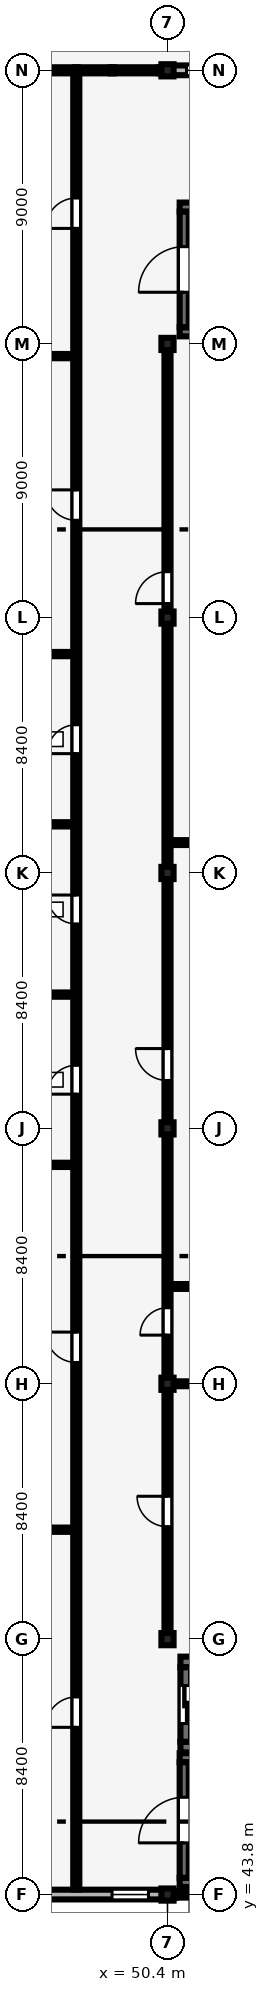
"""IFC4 building model, lengths in metres.
Left out: names, types, materials, properties, quantities, classifications, styles, units other than length and angle.
Written with IfcOpenShell. Run it as: python <this file> out.ifc"""

import sys

from ifc_helpers import new_model, si_unit, direction, frame, frame_2d, origin, origin_2d, place, context, subcontext, project, spatial, rectangle, extrude, element, fill, save


model = new_model("IFC4")
c1 = context("Model", 3, precision=1e-05, world=origin(), true_north=direction((0.0, 1.0)))
c2 = subcontext(c1, "Body", "Model", "MODEL_VIEW")
j1 = project(units=[si_unit("LENGTHUNIT", "METRE"), si_unit("PLANEANGLEUNIT", "RADIAN")], contexts=[c1])
p1 = place(None, origin())
s1 = spatial("IfcSite", under=j1, at=p1, CompositionType="ELEMENT")
p2 = place(p1, origin())
s2 = spatial("IfcBuilding", under=s1, at=p2, CompositionType="ELEMENT")
p3 = place(p2, frame((0.0, 0.0, 21.6)))
s3 = spatial("IfcBuildingStorey", under=s2, at=p3, CompositionType="ELEMENT", Elevation=21.6)
for number, where, z_axis, x_axis in (
    (1, (50.4, 43.8, 0.0), (0.0, 0.0, 1.0), (1.0, 0.0, 0.0)),
    (2, (50.4, 52.2, 0.0), (0.0, 0.0, 1.0), (1.0, 0.0, 0.0)),
    (3, (50.4, 60.6, 0.0), (0.0, 0.0, 1.0), (1.0, 0.0, 0.0)),
    (4, (50.4, 69.0, 0.0), (0.0, 0.0, 1.0), (1.0, 0.0, 0.0)),
    (5, (50.4, 77.4, 0.0), (0.0, 0.0, 1.0), (1.0, 0.0, 0.0)),
    (6, (50.4, 85.8, 0.0), (0.0, 0.0, 1.0), (1.0, 0.0, 0.0)),
    (7, (50.4, 94.8, 0.0), (0.0, 0.0, 1.0), (1.0, 0.0, 0.0)),
    (8, (50.4, 103.8, 0.0), (0.0, 0.0, 1.0), (1.0, 0.0, 0.0)),
):
    element("IfcColumn", number, at=place(p3, frame(where, z_axis=z_axis, x_axis=x_axis)), inside=s3, PredefinedType="COLUMN", context=c2, shape_type="SweptSolid", body=[
        extrude(rectangle(XDim=0.4, YDim=0.4, at=origin_2d()), origin(), (0.0, 0.0, 1.0), 4.2),
    ])
p4 = place(p3, frame((42.175, 43.8, 0.0), z_axis=(0.0, 0.0, 1.0), x_axis=(1.0, 0.0, 0.0)))
e9 = element("IfcWall", 9, at=p4, inside=s3, PredefinedType="SOLIDWALL", context=c2, shape_type="SweptSolid", body=[
    extrude(rectangle(XDim=8.05, YDim=0.32, at=frame_2d((4.025, 0.0))), origin(), (0.0, 0.0, 1.0), 3.48),
])
p5 = place(p4, frame((0.45, 0.0, 0.9)))
e10 = element("IfcOpeningElement", 10, at=p5, cuts=e9, PredefinedType="OPENING", context=c2, shape_type="SweptSolid", body=[
    extrude(rectangle(XDim=1.2, YDim=1.5, at=frame_2d((0.6, 0.75))), frame((0.0, 0.17, 0.0), z_axis=(0.0, -1.0, 0.0), x_axis=(1.0, 0.0, 0.0)), (0.0, 0.0, 1.0), 0.34),
])
p6 = place(p4, frame((6.4, 0.0, 0.9)))
e11 = element("IfcOpeningElement", 11, at=p6, cuts=e9, PredefinedType="OPENING", context=c2, shape_type="SweptSolid", body=[
    extrude(rectangle(XDim=1.2, YDim=1.8, at=frame_2d((0.6, 0.9))), frame((0.0, 0.17, 0.0), z_axis=(0.0, -1.0, 0.0), x_axis=(1.0, 0.0, 0.0)), (0.0, 0.0, 1.0), 0.34),
])
p7 = place(p3, frame((50.575, 103.8, 0.0), z_axis=(0.0, 0.0, 1.0), x_axis=(1.0, 0.0, 0.0)))
e12 = element("IfcWall", 12, at=p7, inside=s3, PredefinedType="SOLIDWALL", context=c2, shape_type="SweptSolid", body=[
    extrude(rectangle(XDim=8.05, YDim=0.32, at=frame_2d((4.025, 0.0))), origin(), (0.0, 0.0, 1.0), 3.48),
])
p8 = place(p7, frame((0.45, 0.0, 0.9)))
e13 = element("IfcOpeningElement", 13, at=p8, cuts=e12, PredefinedType="OPENING", context=c2, shape_type="SweptSolid", body=[
    extrude(rectangle(XDim=1.2, YDim=1.8, at=frame_2d((0.6, 0.9))), frame((0.0, 0.17, 0.0), z_axis=(0.0, -1.0, 0.0), x_axis=(1.0, 0.0, 0.0)), (0.0, 0.0, 1.0), 0.34),
])
p9 = place(p7, frame((5.77, 0.0, 0.9)))
e14 = element("IfcOpeningElement", 14, at=p9, cuts=e12, PredefinedType="OPENING", context=c2, shape_type="SweptSolid", body=[
    extrude(rectangle(XDim=1.68, YDim=2.4, at=frame_2d((0.84, 1.2))), frame((0.0, 0.17, 0.0), z_axis=(0.0, -1.0, 0.0), x_axis=(1.0, 0.0, 0.0)), (0.0, 0.0, 1.0), 0.34),
])
for number, where, z_axis, x_axis in (
    (15, (50.8, 44.2, 0.0), (0.0, 0.0, 1.0), (1.0, 0.0, 0.0)),
    (16, (50.8, 48.3, 0.0), (0.0, 0.0, 1.0), (1.0, 0.0, 0.0)),
):
    element("IfcWall", number, at=place(p3, frame(where, z_axis=z_axis, x_axis=x_axis)), inside=s3, PredefinedType="SHEAR", context=c2, shape_type="SweptSolid", body=[
        extrude(rectangle(XDim=7.6, YDim=0.3, at=frame_2d((3.8, 0.0))), origin(), (0.0, 0.0, 1.0), 4.025),
    ])
p10 = place(p3, frame((50.95, 44.35, 0.0), z_axis=(0.0, 0.0, 1.0), x_axis=(0.0, 1.0, 0.0)))
e17 = element("IfcWall", 17, at=p10, inside=s3, PredefinedType="SHEAR", context=c2, shape_type="SweptSolid", body=[
    extrude(rectangle(XDim=3.8, YDim=0.3, at=frame_2d((1.9, 0.0))), origin(), (0.0, 0.0, 1.0), 4.025),
])
p11 = place(p10, frame((1.15, 0.0, 0.0)))
e18 = element("IfcOpeningElement", 18, at=p11, cuts=e17, PredefinedType="OPENING", context=c2, shape_type="SweptSolid", body=[
    extrude(rectangle(XDim=1.5, YDim=2.2, at=frame_2d((0.75, 1.1))), frame((0.0, 0.16, 0.0), z_axis=(0.0, -1.0, 0.0), x_axis=(1.0, 0.0, 0.0)), (0.0, 0.0, 1.0), 0.32),
])
for number, where, z_axis, x_axis in (
    (19, (50.825, 48.65, 0.0), (0.0, 0.0, 1.0), (1.0, 0.0, 0.0)),
    (20, (50.825, 51.45, 0.0), (0.0, 0.0, 1.0), (1.0, 0.0, 0.0)),
):
    element("IfcWall", number, at=place(p3, frame(where, z_axis=z_axis, x_axis=x_axis)), inside=s3, PredefinedType="SHEAR", context=c2, shape_type="SweptSolid", body=[
        extrude(rectangle(XDim=3.55, YDim=0.35, at=frame_2d((1.775, 0.0))), origin(), (0.0, 0.0, 1.0), 3.92),
    ])
p12 = place(p3, frame((51.0, 48.825, 0.0), z_axis=(0.0, 0.0, 1.0), x_axis=(0.0, 1.0, 0.0)))
e21 = element("IfcWall", 21, at=p12, inside=s3, PredefinedType="SHEAR", context=c2, shape_type="SweptSolid", body=[
    extrude(rectangle(XDim=2.45, YDim=0.35, at=frame_2d((1.225, 0.0))), origin(), (0.0, 0.0, 1.0), 3.92),
])
p13 = place(p12, frame((0.6, 0.0, 0.0)))
e22 = element("IfcOpeningElement", 22, at=p13, cuts=e21, PredefinedType="OPENING", context=c2, shape_type="SweptSolid", body=[
    extrude(rectangle(XDim=1.25, YDim=2.25, at=frame_2d((0.625, 1.125))), frame((0.0, 0.185, 0.0), z_axis=(0.0, -1.0, 0.0), x_axis=(1.0, 0.0, 0.0)), (0.0, 0.0, 1.0), 0.37),
])
for number, where, z_axis, x_axis in (
    (23, (50.8, 95.2, 0.0), (0.0, 0.0, 1.0), (1.0, 0.0, 0.0)),
    (24, (50.8, 99.3, 0.0), (0.0, 0.0, 1.0), (1.0, 0.0, 0.0)),
):
    element("IfcWall", number, at=place(p3, frame(where, z_axis=z_axis, x_axis=x_axis)), inside=s3, PredefinedType="SHEAR", context=c2, shape_type="SweptSolid", body=[
        extrude(rectangle(XDim=7.6, YDim=0.3, at=frame_2d((3.8, 0.0))), origin(), (0.0, 0.0, 1.0), 4.025),
    ])
p14 = place(p3, frame((50.95, 95.35, 0.0), z_axis=(0.0, 0.0, 1.0), x_axis=(0.0, 1.0, 0.0)))
e25 = element("IfcWall", 25, at=p14, inside=s3, PredefinedType="SHEAR", context=c2, shape_type="SweptSolid", body=[
    extrude(rectangle(XDim=3.8, YDim=0.3, at=frame_2d((1.9, 0.0))), origin(), (0.0, 0.0, 1.0), 4.025),
])
p15 = place(p14, frame((1.15, 0.0, 0.0)))
e26 = element("IfcOpeningElement", 26, at=p15, cuts=e25, PredefinedType="OPENING", context=c2, shape_type="SweptSolid", body=[
    extrude(rectangle(XDim=1.5, YDim=2.2, at=frame_2d((0.75, 1.1))), frame((0.0, 0.16, 0.0), z_axis=(0.0, -1.0, 0.0), x_axis=(1.0, 0.0, 0.0)), (0.0, 0.0, 1.0), 0.32),
])
p16 = place(p3, frame((42.105, 55.8, 0.0), z_axis=(0.0, 0.0, 1.0), x_axis=(1.0, 0.0, 0.0)))
e27 = element("IfcWall", 27, at=p16, inside=s3, PredefinedType="PARTITIONING", context=c2, shape_type="SweptSolid", body=[
    extrude(rectangle(XDim=5.19, YDim=0.14, at=frame_2d((2.595, 0.0))), origin(), (0.0, 0.0, 1.0), 3.9),
])
for number, where, z_axis, x_axis in (
    (28, (42.195, 67.8, 0.0), (0.0, 0.0, 1.0), (1.0, 0.0, 0.0)),
    (29, (42.195, 73.4, 0.0), (0.0, 0.0, 1.0), (1.0, 0.0, 0.0)),
    (30, (42.195, 79.0, 0.0), (0.0, 0.0, 1.0), (1.0, 0.0, 0.0)),
    (31, (42.195, 84.6, 0.0), (0.0, 0.0, 1.0), (1.0, 0.0, 0.0)),
):
    element("IfcWall", number, at=place(p3, frame(where, z_axis=z_axis, x_axis=x_axis)), inside=s3, PredefinedType="PARTITIONING", context=c2, shape_type="SweptSolid", body=[
        extrude(rectangle(XDim=5.1, YDim=0.14, at=frame_2d((2.55, 0.0))), origin(), (0.0, 0.0, 1.0), 3.9),
    ])
p17 = place(p3, frame((42.195, 94.4, 0.0), z_axis=(0.0, 0.0, 1.0), x_axis=(1.0, 0.0, 0.0)))
e32 = element("IfcWall", 32, at=p17, inside=s3, PredefinedType="PARTITIONING", context=c2, shape_type="SweptSolid", body=[
    extrude(rectangle(XDim=5.1, YDim=0.14, at=frame_2d((2.55, 0.0))), origin(), (0.0, 0.0, 1.0), 3.43),
])
p18 = place(p3, frame((47.4, 43.965, 0.0), z_axis=(0.0, 0.0, 1.0), x_axis=(0.0, 1.0, 0.0)))
e33 = element("IfcWall", 33, at=p18, inside=s3, PredefinedType="PARTITIONING", context=c2, shape_type="SweptSolid", body=[
    extrude(rectangle(XDim=59.73, YDim=0.2, at=frame_2d((29.865, 0.0))), origin(), (0.0, 0.0, 1.0), 3.9),
])
p19 = place(p18, frame((5.335, 0.0, 0.0)))
e34 = element("IfcOpeningElement", 34, at=p19, cuts=e33, PredefinedType="OPENING", context=c2, shape_type="SweptSolid", body=[
    extrude(rectangle(XDim=1.0, YDim=2.15, at=frame_2d((0.5, 1.075))), frame((0.0, 0.11, 0.0), z_axis=(0.0, -1.0, 0.0), x_axis=(1.0, 0.0, 0.0)), (0.0, 0.0, 1.0), 0.22),
])
p20 = place(p18, frame((17.335, 0.0, 0.0)))
e35 = element("IfcOpeningElement", 35, at=p20, cuts=e33, PredefinedType="OPENING", context=c2, shape_type="SweptSolid", body=[
    extrude(rectangle(XDim=1.0, YDim=2.15, at=frame_2d((0.5, 1.075))), frame((0.0, 0.11, 0.0), z_axis=(0.0, -1.0, 0.0), x_axis=(1.0, 0.0, 0.0)), (0.0, 0.0, 1.0), 0.22),
])
p21 = place(p18, frame((26.16, 0.0, 0.0)))
e36 = element("IfcOpeningElement", 36, at=p21, cuts=e33, PredefinedType="OPENING", context=c2, shape_type="SweptSolid", body=[
    extrude(rectangle(XDim=0.95, YDim=2.2, at=frame_2d((0.475, 1.1))), frame((0.0, 0.11, 0.0), z_axis=(0.0, -1.0, 0.0), x_axis=(1.0, 0.0, 0.0)), (0.0, 0.0, 1.0), 0.22),
])
p22 = place(p18, frame((31.76, 0.0, 0.0)))
e37 = element("IfcOpeningElement", 37, at=p22, cuts=e33, PredefinedType="OPENING", context=c2, shape_type="SweptSolid", body=[
    extrude(rectangle(XDim=0.95, YDim=2.2, at=frame_2d((0.475, 1.1))), frame((0.0, 0.11, 0.0), z_axis=(0.0, -1.0, 0.0), x_axis=(1.0, 0.0, 0.0)), (0.0, 0.0, 1.0), 0.22),
])
p23 = place(p18, frame((37.36, 0.0, 0.0)))
e38 = element("IfcOpeningElement", 38, at=p23, cuts=e33, PredefinedType="OPENING", context=c2, shape_type="SweptSolid", body=[
    extrude(rectangle(XDim=0.95, YDim=2.1, at=frame_2d((0.475, 1.05))), frame((0.0, 0.11, 0.0), z_axis=(0.0, -1.0, 0.0), x_axis=(1.0, 0.0, 0.0)), (0.0, 0.0, 1.0), 0.22),
])
p24 = place(p18, frame((45.035, 0.0, 0.0)))
e39 = element("IfcOpeningElement", 39, at=p24, cuts=e33, PredefinedType="OPENING", context=c2, shape_type="SweptSolid", body=[
    extrude(rectangle(XDim=1.0, YDim=2.15, at=frame_2d((0.5, 1.075))), frame((0.0, 0.11, 0.0), z_axis=(0.0, -1.0, 0.0), x_axis=(1.0, 0.0, 0.0)), (0.0, 0.0, 1.0), 0.22),
])
p25 = place(p18, frame((54.635, 0.0, 0.0)))
e40 = element("IfcOpeningElement", 40, at=p25, cuts=e33, PredefinedType="OPENING", context=c2, shape_type="SweptSolid", body=[
    extrude(rectangle(XDim=1.0, YDim=2.15, at=frame_2d((0.5, 1.075))), frame((0.0, 0.11, 0.0), z_axis=(0.0, -1.0, 0.0), x_axis=(1.0, 0.0, 0.0)), (0.0, 0.0, 1.0), 0.22),
])
p26 = place(p3, frame((50.505, 60.6, 0.0), z_axis=(0.0, 0.0, 1.0), x_axis=(1.0, 0.0, 0.0)))
e41 = element("IfcWall", 41, at=p26, inside=s3, PredefinedType="PARTITIONING", context=c2, shape_type="SweptSolid", body=[
    extrude(rectangle(XDim=8.19, YDim=0.16, at=frame_2d((4.095, 0.0))), origin(), (0.0, 0.0, 1.0), 3.43),
])
p27 = place(p3, frame((50.505, 63.8, 0.0), z_axis=(0.0, 0.0, 1.0), x_axis=(1.0, 0.0, 0.0)))
e42 = element("IfcWall", 42, at=p27, inside=s3, PredefinedType="PARTITIONING", context=c2, shape_type="SweptSolid", body=[
    extrude(rectangle(XDim=8.13, YDim=0.16, at=frame_2d((4.065, 0.0))), origin(), (0.0, 0.0, 1.0), 3.451),
])
p28 = place(p3, frame((50.505, 78.4, 0.0), z_axis=(0.0, 0.0, 1.0), x_axis=(1.0, 0.0, 0.0)))
e43 = element("IfcWall", 43, at=p28, inside=s3, PredefinedType="PARTITIONING", context=c2, shape_type="SweptSolid", body=[
    extrude(rectangle(XDim=8.13, YDim=0.16, at=frame_2d((4.065, 0.0))), origin(), (0.0, 0.0, 1.0), 3.9),
])
p29 = place(p3, frame((50.4, 52.41, 0.0), z_axis=(0.0, 0.0, 1.0), x_axis=(0.0, 1.0, 0.0)))
e44 = element("IfcWall", 44, at=p29, inside=s3, PredefinedType="PARTITIONING", context=c2, shape_type="SweptSolid", body=[
    extrude(rectangle(XDim=7.98, YDim=0.2, at=frame_2d((3.99, 0.0))), origin(), (0.0, 0.0, 1.0), 3.48),
])
p30 = place(p29, frame((3.49, 0.0, 0.0)))
e45 = element("IfcOpeningElement", 45, at=p30, cuts=e44, PredefinedType="OPENING", context=c2, shape_type="SweptSolid", body=[
    extrude(rectangle(XDim=1.0, YDim=2.15, at=frame_2d((0.5, 1.075))), frame((0.0, 0.11, 0.0), z_axis=(0.0, -1.0, 0.0), x_axis=(1.0, 0.0, 0.0)), (0.0, 0.0, 1.0), 0.22),
])
p31 = place(p3, frame((50.4, 60.81, 0.0), z_axis=(0.0, 0.0, 1.0), x_axis=(0.0, 1.0, 0.0)))
e46 = element("IfcWall", 46, at=p31, inside=s3, PredefinedType="PARTITIONING", context=c2, shape_type="SweptSolid", body=[
    extrude(rectangle(XDim=7.98, YDim=0.2, at=frame_2d((3.99, 0.0))), origin(), (0.0, 0.0, 1.0), 3.43),
])
p32 = place(p31, frame((1.39, 0.0, 0.0)))
e47 = element("IfcOpeningElement", 47, at=p32, cuts=e46, PredefinedType="OPENING", context=c2, shape_type="SweptSolid", body=[
    extrude(rectangle(XDim=0.9, YDim=2.1, at=frame_2d((0.45, 1.05))), frame((0.0, 0.11, 0.0), z_axis=(0.0, -1.0, 0.0), x_axis=(1.0, 0.0, 0.0)), (0.0, 0.0, 1.0), 0.22),
])
p33 = place(p3, frame((50.4, 69.21, 0.0), z_axis=(0.0, 0.0, 1.0), x_axis=(0.0, 1.0, 0.0)))
e48 = element("IfcWall", 48, at=p33, inside=s3, PredefinedType="PARTITIONING", context=c2, shape_type="SweptSolid", body=[
    extrude(rectangle(XDim=7.98, YDim=0.2, at=frame_2d((3.99, 0.0))), origin(), (0.0, 0.0, 1.0), 3.48),
])
p34 = place(p33, frame((1.365, 0.0, 0.0)))
e49 = element("IfcOpeningElement", 49, at=p34, cuts=e48, PredefinedType="OPENING", context=c2, shape_type="SweptSolid", body=[
    extrude(rectangle(XDim=1.05, YDim=2.2, at=frame_2d((0.525, 1.1))), frame((0.0, 0.11, 0.0), z_axis=(0.0, -1.0, 0.0), x_axis=(1.0, 0.0, 0.0)), (0.0, 0.0, 1.0), 0.22),
])
p35 = place(p3, frame((50.4, 77.61, 0.0), z_axis=(0.0, 0.0, 1.0), x_axis=(0.0, 1.0, 0.0)))
e50 = element("IfcWall", 50, at=p35, inside=s3, PredefinedType="PARTITIONING", context=c2, shape_type="SweptSolid", body=[
    extrude(rectangle(XDim=7.98, YDim=0.2, at=frame_2d((3.99, 0.0))), origin(), (0.0, 0.0, 1.0), 3.43),
])
p36 = place(p3, frame((50.4, 86.01, 0.0), z_axis=(0.0, 0.0, 1.0), x_axis=(0.0, 1.0, 0.0)))
e51 = element("IfcWall", 51, at=p36, inside=s3, PredefinedType="PARTITIONING", context=c2, shape_type="SweptSolid", body=[
    extrude(rectangle(XDim=8.58, YDim=0.2, at=frame_2d((4.29, 0.0))), origin(), (0.0, 0.0, 1.0), 3.48),
])
p37 = place(p36, frame((0.25, 0.0, 0.0)))
e52 = element("IfcOpeningElement", 52, at=p37, cuts=e51, PredefinedType="OPENING", context=c2, shape_type="SweptSolid", body=[
    extrude(rectangle(XDim=1.05, YDim=2.2, at=frame_2d((0.525, 1.1))), frame((0.0, 0.11, 0.0), z_axis=(0.0, -1.0, 0.0), x_axis=(1.0, 0.0, 0.0)), (0.0, 0.0, 1.0), 0.22),
])
p38 = place(p6, origin())
e53 = element("IfcWindow", 53, at=p38, inside=s3, PartitioningType="SINGLE_PANEL", PredefinedType="WINDOW", context=c2, shape_type="SweptSolid", body=[
    extrude(rectangle(XDim=1.2, YDim=1.8, at=frame_2d((0.6, 0.9))), frame((0.0, 0.03, 0.0), z_axis=(0.0, -1.0, 0.0), x_axis=(1.0, 0.0, 0.0)), (0.0, 0.0, 1.0), 0.06),
])
fill(e11, e53)
p39 = place(p8, origin())
e54 = element("IfcWindow", 54, at=p39, inside=s3, PartitioningType="SINGLE_PANEL", PredefinedType="WINDOW", context=c2, shape_type="SweptSolid", body=[
    extrude(rectangle(XDim=1.2, YDim=1.8, at=frame_2d((0.6, 0.9))), frame((0.0, 0.03, 0.0), z_axis=(0.0, -1.0, 0.0), x_axis=(1.0, 0.0, 0.0)), (0.0, 0.0, 1.0), 0.06),
])
fill(e13, e54)
p40 = place(p11, origin())
e55 = element("IfcDoor", 55, at=p40, inside=s3, OperationType="DOUBLE_DOOR_SINGLE_SWING", PredefinedType="DOOR", context=c2, shape_type="SweptSolid", body=[
    extrude(rectangle(XDim=1.5, YDim=2.2, at=frame_2d((0.75, 1.1))), frame((0.0, 0.025, 0.0), z_axis=(0.0, -1.0, 0.0), x_axis=(1.0, 0.0, 0.0)), (0.0, 0.0, 1.0), 0.05),
])
fill(e18, e55)
p41 = place(p13, origin())
e56 = element("IfcDoor", 56, at=p41, inside=s3, OperationType="DOUBLE_DOOR_SLIDING", PredefinedType="DOOR", context=c2, shape_type="SweptSolid", body=[
    extrude(rectangle(XDim=1.25, YDim=2.25, at=frame_2d((0.625, 1.125))), frame((0.0, 0.025, 0.0), z_axis=(0.0, -1.0, 0.0), x_axis=(1.0, 0.0, 0.0)), (0.0, 0.0, 1.0), 0.05),
])
fill(e22, e56)
p42 = place(p15, origin())
e57 = element("IfcDoor", 57, at=p42, inside=s3, OperationType="DOUBLE_DOOR_SINGLE_SWING", PredefinedType="DOOR", context=c2, shape_type="SweptSolid", body=[
    extrude(rectangle(XDim=1.5, YDim=2.2, at=frame_2d((0.75, 1.1))), frame((0.0, 0.025, 0.0), z_axis=(0.0, -1.0, 0.0), x_axis=(1.0, 0.0, 0.0)), (0.0, 0.0, 1.0), 0.05),
])
fill(e26, e57)
p43 = place(p19, origin())
e58 = element("IfcDoor", 58, at=p43, inside=s3, OperationType="SINGLE_SWING_LEFT", PredefinedType="DOOR", context=c2, shape_type="SweptSolid", body=[
    extrude(rectangle(XDim=1.0, YDim=2.15, at=frame_2d((0.5, 1.075))), frame((0.0, 0.025, 0.0), z_axis=(0.0, -1.0, 0.0), x_axis=(1.0, 0.0, 0.0)), (0.0, 0.0, 1.0), 0.05),
])
fill(e34, e58)
p44 = place(p20, origin())
e59 = element("IfcDoor", 59, at=p44, inside=s3, OperationType="SINGLE_SWING_RIGHT", PredefinedType="DOOR", context=c2, shape_type="SweptSolid", body=[
    extrude(rectangle(XDim=1.0, YDim=2.15, at=frame_2d((0.5, 1.075))), frame((0.0, 0.025, 0.0), z_axis=(0.0, -1.0, 0.0), x_axis=(1.0, 0.0, 0.0)), (0.0, 0.0, 1.0), 0.05),
])
fill(e35, e59)
p45 = place(p21, origin())
e60 = element("IfcDoor", 60, at=p45, inside=s3, OperationType="SINGLE_SWING_LEFT", PredefinedType="DOOR", context=c2, shape_type="SweptSolid", body=[
    extrude(rectangle(XDim=0.95, YDim=2.2, at=frame_2d((0.475, 1.1))), frame((0.0, 0.025, 0.0), z_axis=(0.0, -1.0, 0.0), x_axis=(1.0, 0.0, 0.0)), (0.0, 0.0, 1.0), 0.05),
])
fill(e36, e60)
p46 = place(p22, origin())
e61 = element("IfcDoor", 61, at=p46, inside=s3, OperationType="SINGLE_SWING_RIGHT", PredefinedType="DOOR", context=c2, shape_type="SweptSolid", body=[
    extrude(rectangle(XDim=0.95, YDim=2.2, at=frame_2d((0.475, 1.1))), frame((0.0, 0.025, 0.0), z_axis=(0.0, -1.0, 0.0), x_axis=(1.0, 0.0, 0.0)), (0.0, 0.0, 1.0), 0.05),
])
fill(e37, e61)
p47 = place(p23, origin())
e62 = element("IfcDoor", 62, at=p47, inside=s3, OperationType="SINGLE_SWING_LEFT", PredefinedType="DOOR", context=c2, shape_type="SweptSolid", body=[
    extrude(rectangle(XDim=0.95, YDim=2.1, at=frame_2d((0.475, 1.05))), frame((0.0, 0.025, 0.0), z_axis=(0.0, -1.0, 0.0), x_axis=(1.0, 0.0, 0.0)), (0.0, 0.0, 1.0), 0.05),
])
fill(e38, e62)
p48 = place(p24, origin())
e63 = element("IfcDoor", 63, at=p48, inside=s3, OperationType="SINGLE_SWING_RIGHT", PredefinedType="DOOR", context=c2, shape_type="SweptSolid", body=[
    extrude(rectangle(XDim=1.0, YDim=2.15, at=frame_2d((0.5, 1.075))), frame((0.0, 0.025, 0.0), z_axis=(0.0, -1.0, 0.0), x_axis=(1.0, 0.0, 0.0)), (0.0, 0.0, 1.0), 0.05),
])
fill(e39, e63)
p49 = place(p25, origin())
e64 = element("IfcDoor", 64, at=p49, inside=s3, OperationType="SINGLE_SWING_LEFT", PredefinedType="DOOR", context=c2, shape_type="SweptSolid", body=[
    extrude(rectangle(XDim=1.0, YDim=2.15, at=frame_2d((0.5, 1.075))), frame((0.0, 0.025, 0.0), z_axis=(0.0, -1.0, 0.0), x_axis=(1.0, 0.0, 0.0)), (0.0, 0.0, 1.0), 0.05),
])
fill(e40, e64)
p50 = place(p30, origin())
e65 = element("IfcDoor", 65, at=p50, inside=s3, OperationType="SINGLE_SWING_RIGHT", PredefinedType="DOOR", context=c2, shape_type="SweptSolid", body=[
    extrude(rectangle(XDim=1.0, YDim=2.15, at=frame_2d((0.5, 1.075))), frame((0.0, 0.025, 0.0), z_axis=(0.0, -1.0, 0.0), x_axis=(1.0, 0.0, 0.0)), (0.0, 0.0, 1.0), 0.05),
])
fill(e45, e65)
p51 = place(p32, origin())
e66 = element("IfcDoor", 66, at=p51, inside=s3, OperationType="SINGLE_SWING_LEFT", PredefinedType="DOOR", context=c2, shape_type="SweptSolid", body=[
    extrude(rectangle(XDim=0.9, YDim=2.1, at=frame_2d((0.45, 1.05))), frame((0.0, 0.025, 0.0), z_axis=(0.0, -1.0, 0.0), x_axis=(1.0, 0.0, 0.0)), (0.0, 0.0, 1.0), 0.05),
])
fill(e47, e66)
p52 = place(p34, origin())
e67 = element("IfcDoor", 67, at=p52, inside=s3, OperationType="SINGLE_SWING_RIGHT", PredefinedType="DOOR", context=c2, shape_type="SweptSolid", body=[
    extrude(rectangle(XDim=1.05, YDim=2.2, at=frame_2d((0.525, 1.1))), frame((0.0, 0.025, 0.0), z_axis=(0.0, -1.0, 0.0), x_axis=(1.0, 0.0, 0.0)), (0.0, 0.0, 1.0), 0.05),
])
fill(e49, e67)
p53 = place(p37, origin())
e68 = element("IfcDoor", 68, at=p53, inside=s3, OperationType="SINGLE_SWING_LEFT", PredefinedType="DOOR", context=c2, shape_type="SweptSolid", body=[
    extrude(rectangle(XDim=1.05, YDim=2.2, at=frame_2d((0.525, 1.1))), frame((0.0, 0.025, 0.0), z_axis=(0.0, -1.0, 0.0), x_axis=(1.0, 0.0, 0.0)), (0.0, 0.0, 1.0), 0.05),
])
fill(e52, e68)
save(model, sys.argv[1])
